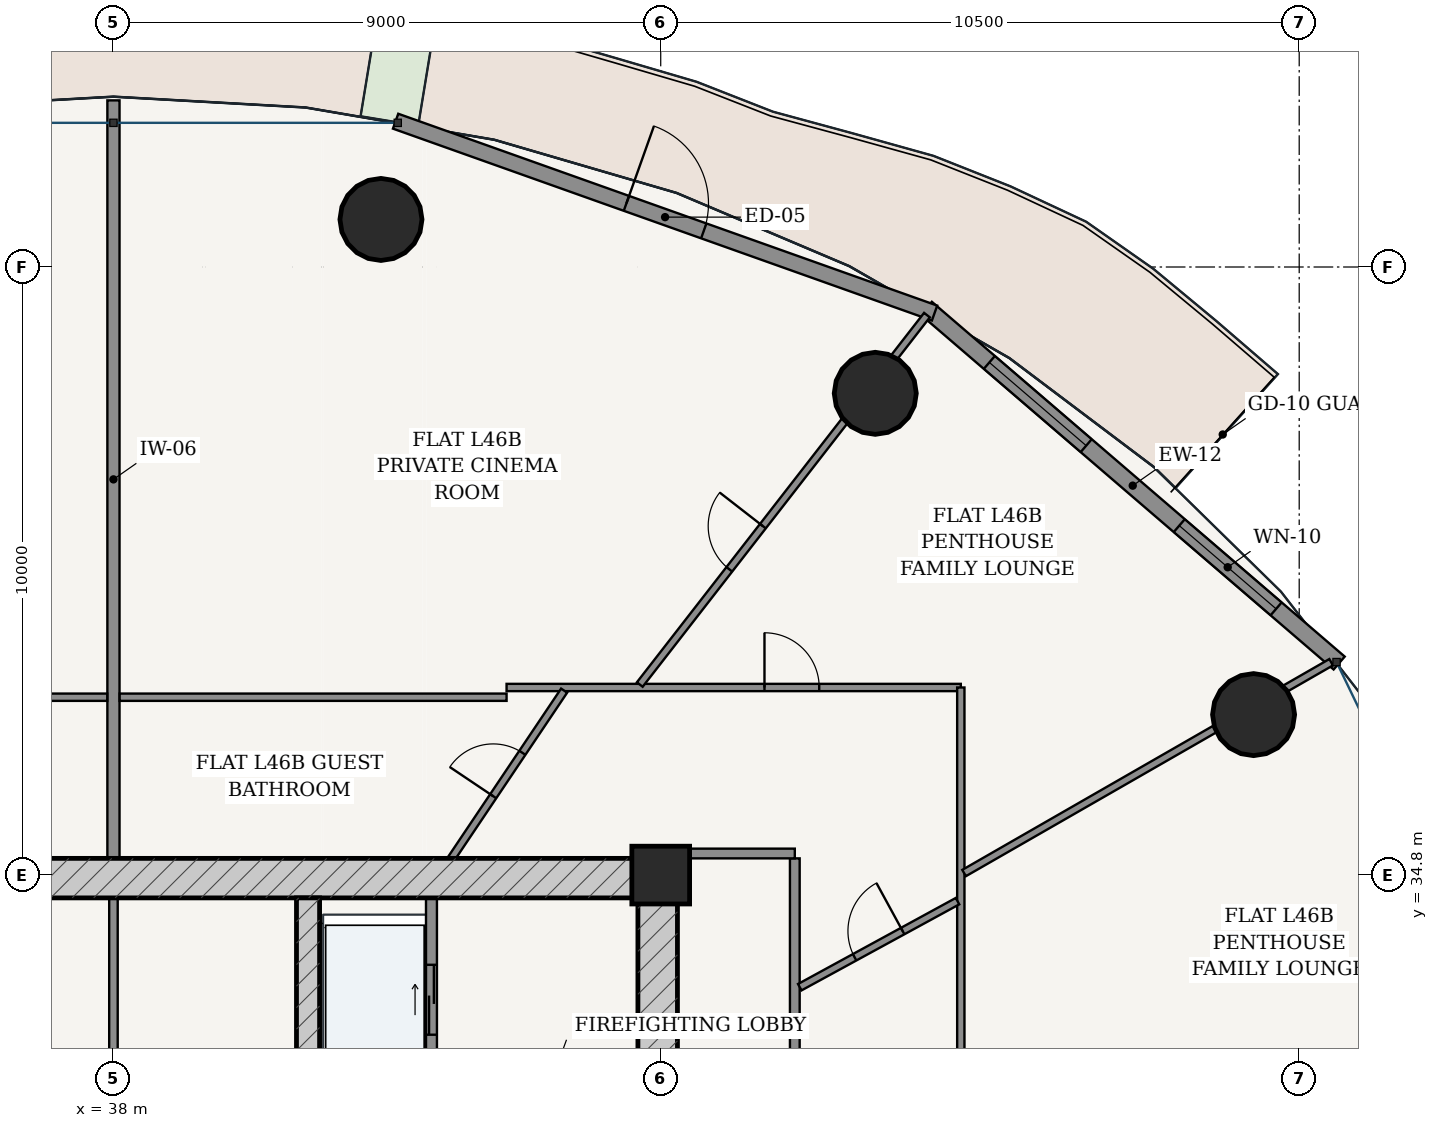
"""IFC4 building model, lengths in metres.
Left out: names, types, materials, properties, quantities, classifications, styles, units other than length and angle.
Written with IfcOpenShell. Run it as: python <this file> out.ifc"""

import sys

from ifc_helpers import new_model, si_unit, direction, frame, frame_2d, origin, origin_2d, place, context, subcontext, project, spatial, rectangle, hollow_circle, extrude, source, transform, mapped, element, fill, save


model = new_model("IFC4")
c1 = context("Model", 3, precision=1e-05, world=origin(), true_north=direction((-0.2419218956, 0.970295726276)))
c2 = subcontext(c1, "Body", "Model", "MODEL_VIEW")
j1 = project(units=[si_unit("LENGTHUNIT", "METRE"), si_unit("PLANEANGLEUNIT", "RADIAN")], contexts=[c1])
p1 = place(None, origin())
s1 = spatial("IfcSite", under=j1, at=p1, CompositionType="ELEMENT")
p2 = place(p1, origin())
s2 = spatial("IfcBuilding", under=s1, at=p2, CompositionType="ELEMENT")
p3 = place(p2, frame((0.0, 0.0, 175.0)))
s3 = spatial("IfcBuildingStorey", under=s2, at=p3, CompositionType="ELEMENT", Elevation=175.0)
p4 = place(p3, frame((47.0, 34.8, 0.0), z_axis=(0.0, 0.0, 1.0), x_axis=(1.0, 0.0, 0.0)))
e1 = element("IfcColumn", 1, at=p4, inside=s3, PredefinedType="COLUMN", context=c2, shape_type="SweptSolid", body=[
    extrude(rectangle(XDim=0.95, YDim=0.95, at=origin_2d()), origin(), (0.0, 0.0, 1.0), 3.6),
])
p5 = place(p3, frame((28.725, 34.75, 0.0), z_axis=(0.0, 0.0, 1.0), x_axis=(1.0, 0.0, 0.0)))
e2 = element("IfcWall", 2, at=p5, inside=s3, PredefinedType="SHEAR", context=c2, shape_type="SweptSolid", body=[
    extrude(rectangle(XDim=18.55, YDim=0.65, at=frame_2d((9.275, 0.0))), origin(), (0.0, 0.0, 1.0), 3.33),
])
p6 = place(p3, frame((46.95, 19.175, 0.0), z_axis=(0.0, 0.0, 1.0), x_axis=(0.0, 1.0, 0.0)))
e3 = element("IfcWall", 3, at=p6, inside=s3, PredefinedType="SHEAR", context=c2, shape_type="SweptSolid", body=[
    extrude(rectangle(XDim=15.25, YDim=0.65, at=frame_2d((7.625, 0.0))), origin(), (0.0, 0.0, 1.0), 3.33),
])
p7 = place(p6, frame((9.875, 0.0, 0.0)))
e4 = element("IfcOpeningElement", 4, at=p7, cuts=e3, PredefinedType="OPENING", context=c2, shape_type="SweptSolid", body=[
    extrude(rectangle(XDim=1.5, YDim=2.2, at=frame_2d((0.75, 1.1))), frame((0.0, 0.335, 0.0), z_axis=(0.0, -1.0, 0.0), x_axis=(1.0, 0.0, 0.0)), (0.0, 0.0, 1.0), 0.67),
])
p8 = place(p3, frame((41.2, 19.175, 0.0), z_axis=(0.0, 0.0, 1.0), x_axis=(0.0, 1.0, 0.0)))
e5 = element("IfcWall", 5, at=p8, inside=s3, PredefinedType="SHEAR", context=c2, shape_type="SweptSolid", body=[
    extrude(rectangle(XDim=15.25, YDim=0.38, at=frame_2d((7.625, 0.0))), origin(), (0.0, 0.0, 1.0), 3.33),
])
p9 = place(p8, frame((7.8, 0.0, 0.0)))
e6 = element("IfcOpeningElement", 6, at=p9, cuts=e5, PredefinedType="OPENING", context=c2, shape_type="SweptSolid", body=[
    extrude(rectangle(XDim=1.05, YDim=2.15, at=frame_2d((0.525, 1.075))), frame((0.0, 0.2, 0.0), z_axis=(0.0, -1.0, 0.0), x_axis=(1.0, 0.0, 0.0)), (0.0, 0.0, 1.0), 0.4),
])
for number, where, z_axis, x_axis in (
    (7, (56.75, 37.439, 0.0), (0.0, 0.0, 1.0), (1.0, 0.0, 0.0)),
    (8, (50.528, 42.723, 0.0), (0.0, 0.0, 1.0), (1.0, 0.0, 0.0)),
    (9, (42.399, 45.582, 0.0), (0.0, 0.0, 1.0), (1.0, 0.0, 0.0)),
):
    element("IfcColumn", number, at=place(p3, frame(where, z_axis=z_axis, x_axis=x_axis)), inside=s3, PredefinedType="COLUMN", context=c2, shape_type="SweptSolid", body=[
        extrude(hollow_circle(Radius=0.675, WallThickness=0.042, at=origin_2d()), origin(), (0.0, 0.0, 1.0), 3.6),
    ])
p10 = place(p3, frame((58.157, 38.287, 0.0), z_axis=(0.0, 0.0, 1.0), x_axis=(-0.75843401647, 0.651749831348, 0.0)))
e10 = element("IfcWall", 10, at=p10, inside=s3, PredefinedType="SOLIDWALL", context=c2, shape_type="SweptSolid", body=[
    extrude(rectangle(XDim=8.952, YDim=0.28, at=frame_2d((4.476, 0.0))), origin(), (0.0, 0.0, 1.0), 3.33),
])
p11 = place(p10, frame((1.367, 0.0, 0.85)))
e11 = element("IfcOpeningElement", 11, at=p11, cuts=e10, PredefinedType="OPENING", context=c2, shape_type="SweptSolid", body=[
    extrude(rectangle(XDim=2.1, YDim=1.95, at=frame_2d((1.05, 0.975))), frame((0.0, 0.15, 0.0), z_axis=(0.0, -1.0, 0.0), x_axis=(1.0, 0.0, 0.0)), (0.0, 0.0, 1.0), 0.3),
])
p12 = place(p10, frame((5.485, 0.0, 0.85)))
e12 = element("IfcOpeningElement", 12, at=p12, cuts=e10, PredefinedType="OPENING", context=c2, shape_type="SweptSolid", body=[
    extrude(rectangle(XDim=2.1, YDim=1.95, at=frame_2d((1.05, 0.975))), frame((0.0, 0.15, 0.0), z_axis=(0.0, -1.0, 0.0), x_axis=(1.0, 0.0, 0.0)), (0.0, 0.0, 1.0), 0.3),
])
p13 = place(p3, frame((51.503, 44.043, 0.0), z_axis=(0.0, 0.0, 1.0), x_axis=(-0.942095406405, 0.335344964522, 0.0)))
e13 = element("IfcWall", 13, at=p13, inside=s3, PredefinedType="SOLIDWALL", context=c2, shape_type="SweptSolid", body=[
    extrude(rectangle(XDim=9.408, YDim=0.26, at=frame_2d((4.704, 0.0))), origin(), (0.0, 0.0, 1.0), 3.33),
])
p14 = place(p13, frame((4.029, 0.0, 0.0)))
e14 = element("IfcOpeningElement", 14, at=p14, cuts=e13, PredefinedType="OPENING", context=c2, shape_type="SweptSolid", body=[
    extrude(rectangle(XDim=1.35, YDim=2.2, at=frame_2d((0.675, 1.1))), frame((0.0, 0.14, 0.0), z_axis=(0.0, -1.0, 0.0), x_axis=(1.0, 0.0, 0.0)), (0.0, 0.0, 1.0), 0.28),
])
p15 = place(p3, frame((43.23, 28.52, 0.0), z_axis=(0.0, 0.0, 1.0), x_axis=(0.0, 1.0, 0.0)))
e15 = element("IfcWall", 15, at=p15, inside=s3, PredefinedType="PARTITIONING", context=c2, shape_type="SweptSolid", body=[
    extrude(rectangle(XDim=5.905, YDim=0.18, at=frame_2d((2.953, 0.0))), origin(), (0.0, 0.0, 1.0), 3.33),
])
p16 = place(p15, frame((0.905, 0.0, 0.0)))
e16 = element("IfcOpeningElement", 16, at=p16, cuts=e15, PredefinedType="OPENING", context=c2, shape_type="SweptSolid", body=[
    extrude(rectangle(XDim=0.85, YDim=2.1, at=frame_2d((0.425, 1.05))), frame((0.0, 0.1, 0.0), z_axis=(0.0, -1.0, 0.0), x_axis=(1.0, 0.0, 0.0)), (0.0, 0.0, 1.0), 0.2),
])
p17 = place(p15, frame((3.655, 0.0, 0.0)))
e17 = element("IfcOpeningElement", 17, at=p17, cuts=e15, PredefinedType="OPENING", context=c2, shape_type="SweptSolid", body=[
    extrude(rectangle(XDim=1.15, YDim=2.2, at=frame_2d((0.575, 1.1))), frame((0.0, 0.1, 0.0), z_axis=(0.0, -1.0, 0.0), x_axis=(1.0, 0.0, 0.0)), (0.0, 0.0, 1.0), 0.2),
])
p18 = place(p3, frame((38.0, 28.56, 0.0), z_axis=(0.0, 0.0, 1.0), x_axis=(0.0, 1.0, 0.0)))
e18 = element("IfcWall", 18, at=p18, inside=s3, PredefinedType="PARTITIONING", context=c2, shape_type="SweptSolid", body=[
    extrude(rectangle(XDim=5.865, YDim=0.14, at=frame_2d((2.933, 0.0))), origin(), (0.0, 0.0, 1.0), 3.33),
])
p19 = place(p3, frame((49.205, 16.675, 0.0), z_axis=(0.0, 0.0, 1.0), x_axis=(0.0, 1.0, 0.0)))
e19 = element("IfcWall", 19, at=p19, inside=s3, PredefinedType="PARTITIONING", context=c2, shape_type="SweptSolid", body=[
    extrude(rectangle(XDim=18.4, YDim=0.16, at=frame_2d((9.2, 0.0))), origin(), (0.0, 0.0, 1.0), 2.776),
])
p20 = place(p3, frame((47.275, 35.155, 0.0), z_axis=(0.0, 0.0, 1.0), x_axis=(1.0, 0.0, 0.0)))
e20 = element("IfcWall", 20, at=p20, inside=s3, PredefinedType="PARTITIONING", context=c2, shape_type="SweptSolid", body=[
    extrude(rectangle(XDim=1.93, YDim=0.16, at=frame_2d((0.965, 0.0))), origin(), (0.0, 0.0, 1.0), 2.776),
])
p21 = place(p3, frame((38.0, 35.075, 0.0), z_axis=(0.0, 0.0, 1.0), x_axis=(0.0, 1.0, 0.0)))
e21 = element("IfcWall", 21, at=p21, inside=s3, PredefinedType="PARTITIONING", context=c2, shape_type="SweptSolid", body=[
    extrude(rectangle(XDim=12.465, YDim=0.2, at=frame_2d((6.232, 0.0))), origin(), (0.0, 0.0, 1.0), 2.415),
])
for number, where, z_axis, x_axis in (
    (22, (31.535, 37.725, 0.0), (0.0, 0.0, 1.0), (1.0, 0.0, 0.0)),
    (23, (38.102, 37.725, 0.0), (0.0, 0.0, 1.0), (1.0, 0.0, 0.0)),
):
    element("IfcWall", number, at=place(p3, frame(where, z_axis=z_axis, x_axis=x_axis)), inside=s3, PredefinedType="PARTITIONING", context=c2, shape_type="SweptSolid", body=[
        extrude(rectangle(XDim=6.363, YDim=0.12, at=frame_2d((3.182, 0.0))), origin(), (0.0, 0.0, 1.0), 2.776),
    ])
p22 = place(p3, frame((44.465, 37.885, 0.0), z_axis=(0.0, 0.0, 1.0), x_axis=(1.0, 0.0, 0.0)))
e24 = element("IfcWall", 24, at=p22, inside=s3, PredefinedType="PARTITIONING", context=c2, shape_type="SweptSolid", body=[
    extrude(rectangle(XDim=7.47, YDim=0.12, at=frame_2d((3.735, 0.0))), origin(), (0.0, 0.0, 1.0), 2.776),
])
p23 = place(p22, frame((4.241, 0.0, 0.0)))
e25 = element("IfcOpeningElement", 25, at=p23, cuts=e24, PredefinedType="OPENING", context=c2, shape_type="SweptSolid", body=[
    extrude(rectangle(XDim=0.9, YDim=2.15, at=frame_2d((0.45, 1.075))), frame((0.0, 0.07, 0.0), z_axis=(0.0, -1.0, 0.0), x_axis=(1.0, 0.0, 0.0)), (0.0, 0.0, 1.0), 0.14),
])
p24 = place(p3, frame((51.935, 37.885, 0.0), z_axis=(0.0, 0.0, 1.0), x_axis=(0.0, -1.0, 0.0)))
e26 = element("IfcWall", 26, at=p24, inside=s3, PredefinedType="PARTITIONING", context=c2, shape_type="SweptSolid", body=[
    extrude(rectangle(XDim=24.02, YDim=0.12, at=frame_2d((12.01, 0.0))), origin(), (0.0, 0.0, 1.0), 2.776),
])
p25 = place(p24, frame((19.821, 0.0, 0.0)))
e27 = element("IfcOpeningElement", 27, at=p25, cuts=e26, PredefinedType="OPENING", context=c2, shape_type="SweptSolid", body=[
    extrude(rectangle(XDim=0.9, YDim=2.15, at=frame_2d((0.45, 1.075))), frame((0.0, 0.07, 0.0), z_axis=(0.0, -1.0, 0.0), x_axis=(1.0, 0.0, 0.0)), (0.0, 0.0, 1.0), 0.14),
])
p26 = place(p3, frame((51.989, 34.834, 0.0), z_axis=(0.0, 0.0, 1.0), x_axis=(0.86717064002, 0.498011125466, 0.0)))
e28 = element("IfcWall", 28, at=p26, inside=s3, PredefinedType="PARTITIONING", context=c2, shape_type="SweptSolid", body=[
    extrude(rectangle(XDim=6.961, YDim=0.12, at=frame_2d((3.48, 0.0))), origin(), (0.0, 0.0, 1.0), 2.776),
])
p27 = place(p3, frame((46.656, 37.934, 0.0), z_axis=(0.0, 0.0, 1.0), x_axis=(0.613758289074, 0.789493991487, 0.0)))
e29 = element("IfcWall", 29, at=p27, inside=s3, PredefinedType="PARTITIONING", context=c2, shape_type="SweptSolid", body=[
    extrude(rectangle(XDim=7.695, YDim=0.12, at=frame_2d((3.848, 0.0))), origin(), (0.0, 0.0, 1.0), 2.776),
])
p28 = place(p27, frame((2.399, 0.0, 0.0)))
e30 = element("IfcOpeningElement", 30, at=p28, cuts=e29, PredefinedType="OPENING", context=c2, shape_type="SweptSolid", body=[
    extrude(rectangle(XDim=0.9, YDim=2.15, at=frame_2d((0.45, 1.075))), frame((0.0, 0.07, 0.0), z_axis=(0.0, -1.0, 0.0), x_axis=(1.0, 0.0, 0.0)), (0.0, 0.0, 1.0), 0.14),
])
p29 = place(p3, frame((49.287, 32.957, 0.0), z_axis=(0.0, 0.0, 1.0), x_axis=(0.877892414948, 0.47885792024, 0.0)))
e31 = element("IfcWall", 31, at=p29, inside=s3, PredefinedType="PARTITIONING", context=c2, shape_type="SweptSolid", body=[
    extrude(rectangle(XDim=2.955, YDim=0.12, at=frame_2d((1.477, 0.0))), origin(), (0.0, 0.0, 1.0), 3.33),
])
p30 = place(p29, frame((1.027, 0.0, 0.0)))
e32 = element("IfcOpeningElement", 32, at=p30, cuts=e31, PredefinedType="OPENING", context=c2, shape_type="SweptSolid", body=[
    extrude(rectangle(XDim=0.9, YDim=2.15, at=frame_2d((0.45, 1.075))), frame((0.0, 0.07, 0.0), z_axis=(0.0, -1.0, 0.0), x_axis=(1.0, 0.0, 0.0)), (0.0, 0.0, 1.0), 0.14),
])
p31 = place(p3, frame((43.559, 35.075, 0.0), z_axis=(0.0, 0.0, 1.0), x_axis=(0.557612855606, 0.830101140381, 0.0)))
e33 = element("IfcWall", 33, at=p31, inside=s3, PredefinedType="PARTITIONING", context=c2, shape_type="SweptSolid", body=[
    extrude(rectangle(XDim=3.323, YDim=0.12, at=frame_2d((1.662, 0.0))), origin(), (0.0, 0.0, 1.0), 3.33),
])
p32 = place(p31, frame((1.232, 0.0, 0.0)))
e34 = element("IfcOpeningElement", 34, at=p32, cuts=e33, PredefinedType="OPENING", context=c2, shape_type="SweptSolid", body=[
    extrude(rectangle(XDim=0.86, YDim=2.15, at=frame_2d((0.43, 1.075))), frame((0.0, 0.07, 0.0), z_axis=(0.0, -1.0, 0.0), x_axis=(1.0, 0.0, 0.0)), (0.0, 0.0, 1.0), 0.14),
])
m1 = source(origin(), c2, "Body", "SweptSolid", [
    extrude(rectangle(XDim=2.1, YDim=1.95, at=frame_2d((1.05, 0.975))), frame((0.0, 0.03, 0.0), z_axis=(0.0, -1.0, 0.0), x_axis=(1.0, 0.0, 0.0)), (0.0, 0.0, 1.0), 0.06),
])
p33 = place(p11, origin())
e35 = element("IfcWindow", 35, at=p33, inside=s3, PartitioningType="SINGLE_PANEL", PredefinedType="WINDOW", context=c2, shape_type="MappedRepresentation", body=[
    mapped(m1, transform((0.0, 0.0, 0.0), scale=1.0)),
])
fill(e11, e35)
p34 = place(p12, origin())
e36 = element("IfcWindow", 36, at=p34, inside=s3, PartitioningType="SINGLE_PANEL", PredefinedType="WINDOW", context=c2, shape_type="MappedRepresentation", body=[
    mapped(m1, transform((0.0, 0.0, 0.0), scale=1.0)),
])
fill(e12, e36)
m2 = source(origin(), c2, "Body", "SweptSolid", [
    extrude(rectangle(XDim=1.35, YDim=2.2, at=frame_2d((0.675, 1.1))), frame((0.0, 0.025, 0.0), z_axis=(0.0, -1.0, 0.0), x_axis=(1.0, 0.0, 0.0)), (0.0, 0.0, 1.0), 0.05),
])
p35 = place(p14, frame((1.35, 0.0, 0.0), z_axis=(0.0, 0.0, 1.0), x_axis=(-1.0, 0.0, 0.0)))
e37 = element("IfcDoor", 37, at=p35, inside=s3, OperationType="SINGLE_SWING_LEFT", PredefinedType="DOOR", context=c2, shape_type="MappedRepresentation", body=[
    mapped(m2, transform((0.0, 0.0, 0.0), scale=1.0)),
])
fill(e14, e37)
m3 = source(origin(), c2, "Body", "SweptSolid", [
    extrude(rectangle(XDim=1.15, YDim=2.2, at=frame_2d((0.575, 1.1))), frame((0.0, 0.025, 0.0), z_axis=(0.0, -1.0, 0.0), x_axis=(1.0, 0.0, 0.0)), (0.0, 0.0, 1.0), 0.05),
])
p36 = place(p17, origin())
e38 = element("IfcDoor", 38, at=p36, inside=s3, OperationType="DOUBLE_DOOR_SLIDING", PredefinedType="DOOR", context=c2, shape_type="MappedRepresentation", body=[
    mapped(m3, transform((0.0, 0.0, 0.0), scale=1.0)),
])
fill(e17, e38)
m4 = source(origin(), c2, "Body", "SweptSolid", [
    extrude(rectangle(XDim=0.9, YDim=2.15, at=frame_2d((0.45, 1.075))), frame((0.0, 0.025, 0.0), z_axis=(0.0, -1.0, 0.0), x_axis=(1.0, 0.0, 0.0)), (0.0, 0.0, 1.0), 0.05),
])
p37 = place(p30, origin())
e39 = element("IfcDoor", 39, at=p37, inside=s3, OperationType="SINGLE_SWING_RIGHT", PredefinedType="DOOR", context=c2, shape_type="MappedRepresentation", body=[
    mapped(m4, transform((0.0, 0.0, 0.0), scale=1.0)),
])
fill(e32, e39)
m5 = source(origin(), c2, "Body", "SweptSolid", [
    extrude(rectangle(XDim=0.86, YDim=2.15, at=frame_2d((0.43, 1.075))), frame((0.0, 0.025, 0.0), z_axis=(0.0, -1.0, 0.0), x_axis=(1.0, 0.0, 0.0)), (0.0, 0.0, 1.0), 0.05),
])
p38 = place(p32, origin())
e40 = element("IfcDoor", 40, at=p38, inside=s3, OperationType="SINGLE_SWING_LEFT", PredefinedType="DOOR", context=c2, shape_type="MappedRepresentation", body=[
    mapped(m5, transform((0.0, 0.0, 0.0), scale=1.0)),
])
fill(e34, e40)
p39 = place(p23, origin())
e41 = element("IfcDoor", 41, at=p39, inside=s3, OperationType="SINGLE_SWING_LEFT", PredefinedType="DOOR", context=c2, shape_type="MappedRepresentation", body=[
    mapped(m4, transform((0.0, 0.0, 0.0), scale=1.0)),
])
fill(e25, e41)
p40 = place(p28, origin())
e42 = element("IfcDoor", 42, at=p40, inside=s3, OperationType="SINGLE_SWING_RIGHT", PredefinedType="DOOR", context=c2, shape_type="MappedRepresentation", body=[
    mapped(m4, transform((0.0, 0.0, 0.0), scale=1.0)),
])
fill(e30, e42)
save(model, sys.argv[1])
